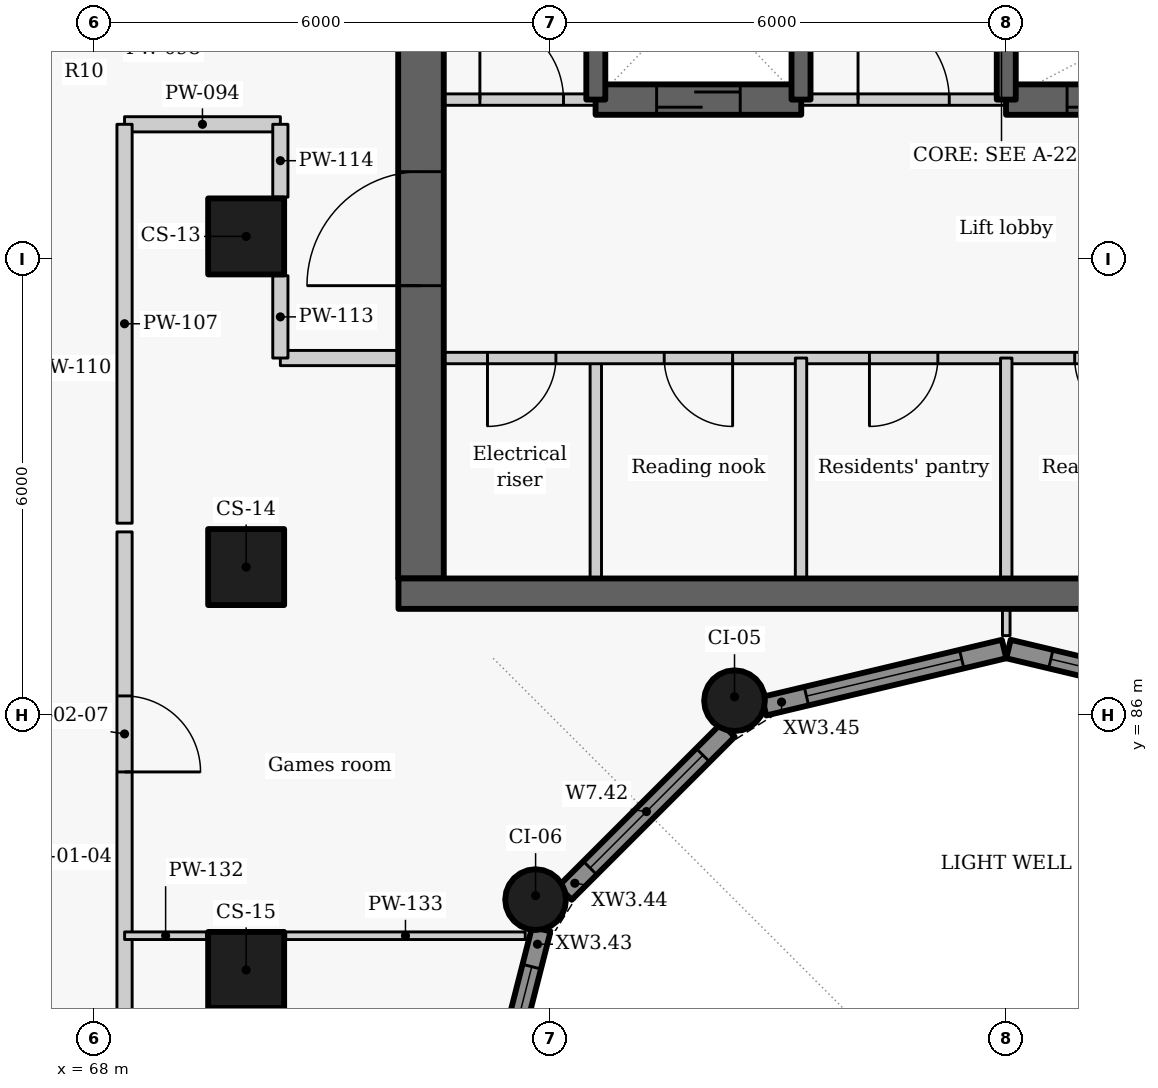
"""IFC4 building model, lengths in metres.
Left out: names, types, materials, properties, quantities, classifications, styles, units other than length and angle.
Written with IfcOpenShell. Run it as: python <this file> out.ifc"""

import sys

from ifc_helpers import new_model, si_unit, direction, frame, frame_2d, origin, origin_2d, place, context, subcontext, project, spatial, rectangle, circle, extrude, element, fill, save


model = new_model("IFC4")
c1 = context("Model", 3, precision=1e-05, world=origin(), true_north=direction((0.0, 1.0)))
c2 = subcontext(c1, "Body", "Model", "MODEL_VIEW")
j1 = project(units=[si_unit("LENGTHUNIT", "METRE"), si_unit("PLANEANGLEUNIT", "RADIAN")], contexts=[c1])
p1 = place(None, origin())
s1 = spatial("IfcSite", under=j1, at=p1, CompositionType="ELEMENT")
p2 = place(p1, origin())
s2 = spatial("IfcBuilding", under=s1, at=p2, CompositionType="ELEMENT")
p3 = place(p2, frame((0.0, 0.0, 160.2)))
s3 = spatial("IfcBuildingStorey", under=s2, at=p3, CompositionType="ELEMENT", Elevation=160.2)
for number, where, z_axis, x_axis in (
    (1, (70.0, 92.3, 0.0), (0.0, 0.0, 1.0), (0.0, -1.0, 0.0)),
    (2, (70.0, 87.95, 0.0), (0.0, 0.0, 1.0), (0.0, -1.0, 0.0)),
    (3, (70.0, 82.65, 0.0), (0.0, 0.0, 1.0), (0.0, -1.0, 0.0)),
):
    element("IfcColumn", number, at=place(p3, frame(where, z_axis=z_axis, x_axis=x_axis)), inside=s3, PredefinedType="COLUMN", context=c2, shape_type="SweptSolid", body=[
        extrude(rectangle(XDim=1.0, YDim=1.0, at=origin_2d()), origin(), (0.0, 0.0, 1.0), 3.3),
    ])
for number, where, z_axis, x_axis in (
    (4, (76.425, 86.192, 0.0), (0.0, 0.0, 1.0), (-0.866, -0.5, 0.0)),
    (5, (73.808, 83.575, 0.0), (0.0, 0.0, 1.0), (-0.5, -0.866, 0.0)),
):
    element("IfcColumn", number, at=place(p3, frame(where, z_axis=z_axis, x_axis=x_axis)), inside=s3, PredefinedType="COLUMN", context=c2, shape_type="SweptSolid", body=[
        extrude(circle(Radius=0.4, at=origin_2d()), origin(), (0.0, 0.0, 1.0), 3.3),
    ])
p4 = place(p3, frame((73.14, 80.27, 0.0), z_axis=(0.0, 0.0, 1.0), x_axis=(0.247055971283, 0.969001211069, 0.0)))
e6 = element("IfcWall", 6, at=p4, inside=s3, PredefinedType="SOLIDWALL", context=c2, shape_type="SweptSolid", body=[
    extrude(rectangle(XDim=3.01, YDim=0.25, at=frame_2d((1.505, 0.0))), origin(), (0.0, 0.0, 1.0), 2.425),
])
p5 = place(p4, frame((0.401, 0.0, 0.9)))
e7 = element("IfcOpeningElement", 7, at=p5, cuts=e6, PredefinedType="OPENING", context=c2, shape_type="SweptSolid", body=[
    extrude(rectangle(XDim=2.1, YDim=1.1, at=frame_2d((1.05, 0.55))), frame((0.0, 0.135, 0.0), z_axis=(0.0, -1.0, 0.0), x_axis=(1.0, 0.0, 0.0)), (0.0, 0.0, 1.0), 0.27),
])
p6 = place(p3, frame((74.194, 83.661, 0.0), z_axis=(0.0, 0.0, 1.0), x_axis=(0.707106781187, 0.707106781187, 0.0)))
e8 = element("IfcWall", 8, at=p6, inside=s3, PredefinedType="SOLIDWALL", context=c2, shape_type="SweptSolid", body=[
    extrude(rectangle(XDim=3.033, YDim=0.25, at=frame_2d((1.517, 0.0))), origin(), (0.0, 0.0, 1.0), 2.425),
])
p7 = place(p6, frame((0.467, 0.0, 0.9)))
e9 = element("IfcOpeningElement", 9, at=p7, cuts=e8, PredefinedType="OPENING", context=c2, shape_type="SweptSolid", body=[
    extrude(rectangle(XDim=2.1, YDim=1.1, at=frame_2d((1.05, 0.55))), frame((0.0, 0.135, 0.0), z_axis=(0.0, -1.0, 0.0), x_axis=(1.0, 0.0, 0.0)), (0.0, 0.0, 1.0), 0.27),
])
p8 = place(p3, frame((76.814, 86.119, 0.0), z_axis=(0.0, 0.0, 1.0), x_axis=(0.972773113459, 0.231759508395, 0.0)))
e10 = element("IfcWall", 10, at=p8, inside=s3, PredefinedType="SOLIDWALL", context=c2, shape_type="SweptSolid", body=[
    extrude(rectangle(XDim=3.246, YDim=0.25, at=frame_2d((1.623, 0.0))), origin(), (0.0, 0.0, 1.0), 2.425),
])
p9 = place(p8, frame((0.573, 0.0, 0.9)))
e11 = element("IfcOpeningElement", 11, at=p9, cuts=e10, PredefinedType="OPENING", context=c2, shape_type="SweptSolid", body=[
    extrude(rectangle(XDim=2.1, YDim=1.1, at=frame_2d((1.05, 0.55))), frame((0.0, 0.135, 0.0), z_axis=(0.0, -1.0, 0.0), x_axis=(1.0, 0.0, 0.0)), (0.0, 0.0, 1.0), 0.27),
])
p10 = place(p3, frame((80.029, 86.872, 0.0), z_axis=(0.0, 0.0, 1.0), x_axis=(0.972773113459, -0.231759508395, 0.0)))
e12 = element("IfcWall", 12, at=p10, inside=s3, PredefinedType="SOLIDWALL", context=c2, shape_type="SweptSolid", body=[
    extrude(rectangle(XDim=3.246, YDim=0.25, at=frame_2d((1.623, 0.0))), origin(), (0.0, 0.0, 1.0), 2.425),
])
p11 = place(p10, frame((0.573, 0.0, 0.9)))
e13 = element("IfcOpeningElement", 13, at=p11, cuts=e12, PredefinedType="OPENING", context=c2, shape_type="SweptSolid", body=[
    extrude(rectangle(XDim=2.1, YDim=1.1, at=frame_2d((1.05, 0.55))), frame((0.0, 0.135, 0.0), z_axis=(0.0, -1.0, 0.0), x_axis=(1.0, 0.0, 0.0)), (0.0, 0.0, 1.0), 0.27),
])
p12 = place(p3, frame((74.6, 87.8, 0.0), z_axis=(0.0, 0.0, 1.0), x_axis=(0.0, 1.0, 0.0)))
e14 = element("IfcWall", 14, at=p12, inside=s3, PredefinedType="PARTITIONING", context=c2, shape_type="SweptSolid", body=[
    extrude(rectangle(XDim=2.9, YDim=0.15, at=frame_2d((1.45, 0.0))), origin(), (0.0, 0.0, 1.0), 3.025),
])
p13 = place(p3, frame((85.4, 90.7, 0.0), z_axis=(0.0, 0.0, 1.0), x_axis=(-1.0, 0.0, 0.0)))
e15 = element("IfcWall", 15, at=p13, inside=s3, PredefinedType="PARTITIONING", context=c2, shape_type="SweptSolid", body=[
    extrude(rectangle(XDim=13.4, YDim=0.15, at=frame_2d((6.7, 0.0))), origin(), (0.0, 0.0, 1.0), 3.025),
])
p14 = place(p13, frame((11.325, 0.0, 0.0)))
e16 = element("IfcOpeningElement", 16, at=p14, cuts=e15, PredefinedType="OPENING", context=c2, shape_type="SweptSolid", body=[
    extrude(rectangle(XDim=0.9, YDim=2.1, at=frame_2d((0.45, 1.05))), frame((0.0, 0.085, 0.0), z_axis=(0.0, -1.0, 0.0), x_axis=(1.0, 0.0, 0.0)), (0.0, 0.0, 1.0), 0.17),
])
p15 = place(p13, frame((9.0, 0.0, 0.0)))
e17 = element("IfcOpeningElement", 17, at=p15, cuts=e15, PredefinedType="OPENING", context=c2, shape_type="SweptSolid", body=[
    extrude(rectangle(XDim=0.9, YDim=2.1, at=frame_2d((0.45, 1.05))), frame((0.0, 0.085, 0.0), z_axis=(0.0, -1.0, 0.0), x_axis=(1.0, 0.0, 0.0)), (0.0, 0.0, 1.0), 0.17),
])
p16 = place(p13, frame((6.3, 0.0, 0.0)))
e18 = element("IfcOpeningElement", 18, at=p16, cuts=e15, PredefinedType="OPENING", context=c2, shape_type="SweptSolid", body=[
    extrude(rectangle(XDim=0.9, YDim=2.1, at=frame_2d((0.45, 1.05))), frame((0.0, 0.085, 0.0), z_axis=(0.0, -1.0, 0.0), x_axis=(1.0, 0.0, 0.0)), (0.0, 0.0, 1.0), 0.17),
])
p17 = place(p13, frame((3.6, 0.0, 0.0)))
e19 = element("IfcOpeningElement", 19, at=p17, cuts=e15, PredefinedType="OPENING", context=c2, shape_type="SweptSolid", body=[
    extrude(rectangle(XDim=0.9, YDim=2.1, at=frame_2d((0.45, 1.05))), frame((0.0, 0.085, 0.0), z_axis=(0.0, -1.0, 0.0), x_axis=(1.0, 0.0, 0.0)), (0.0, 0.0, 1.0), 0.17),
])
p18 = place(p13, frame((0.9, 0.0, 0.0)))
e20 = element("IfcOpeningElement", 20, at=p18, cuts=e15, PredefinedType="OPENING", context=c2, shape_type="SweptSolid", body=[
    extrude(rectangle(XDim=0.9, YDim=2.1, at=frame_2d((0.45, 1.05))), frame((0.0, 0.085, 0.0), z_axis=(0.0, -1.0, 0.0), x_axis=(1.0, 0.0, 0.0)), (0.0, 0.0, 1.0), 0.17),
])
p19 = place(p3, frame((72.3, 87.8, -0.275), z_axis=(0.0, 0.0, 1.0), x_axis=(0.0, 1.0, 0.0)))
e21 = element("IfcWall", 21, at=p19, inside=s3, PredefinedType="SHEAR", context=c2, shape_type="SweptSolid", body=[
    extrude(rectangle(XDim=9.1, YDim=0.6, at=frame_2d((4.55, 0.0))), origin(), (0.0, 0.0, 1.0), 3.3),
])
p20 = place(p19, frame((3.852, 0.0, 0.275)))
e22 = element("IfcOpeningElement", 22, at=p20, cuts=e21, PredefinedType="OPENING", context=c2, shape_type="SweptSolid", body=[
    extrude(rectangle(XDim=1.5, YDim=2.1, at=frame_2d((0.75, 1.05))), frame((0.0, 0.31, 0.0), z_axis=(0.0, -1.0, 0.0), x_axis=(1.0, 0.0, 0.0)), (0.0, 0.0, 1.0), 0.62),
])
for number, where, z_axis, x_axis in (
    (23, (77.3, 87.8, 0.0), (0.0, 0.0, 1.0), (0.0, 1.0, 0.0)),
    (24, (80.0, 87.8, 0.0), (0.0, 0.0, 1.0), (0.0, 1.0, 0.0)),
):
    element("IfcWall", number, at=place(p3, frame(where, z_axis=z_axis, x_axis=x_axis)), inside=s3, PredefinedType="PARTITIONING", context=c2, shape_type="SweptSolid", body=[
        extrude(rectangle(XDim=2.9, YDim=0.15, at=frame_2d((1.45, 0.0))), origin(), (0.0, 0.0, 1.0), 3.025),
    ])
p21 = place(p3, frame((72.0, 94.1, 0.0), z_axis=(0.0, 0.0, 1.0), x_axis=(1.0, 0.0, 0.0)))
e25 = element("IfcWall", 25, at=p21, inside=s3, PredefinedType="PARTITIONING", context=c2, shape_type="SweptSolid", body=[
    extrude(rectangle(XDim=2.603, YDim=0.15, at=frame_2d((1.302, 0.0))), origin(), (0.0, 0.0, 1.0), 3.025),
])
p22 = place(p21, frame((1.075, 0.0, 0.0)))
e26 = element("IfcOpeningElement", 26, at=p22, cuts=e25, PredefinedType="OPENING", context=c2, shape_type="SweptSolid", body=[
    extrude(rectangle(XDim=1.1, YDim=2.1, at=frame_2d((0.55, 1.05))), frame((0.0, 0.085, 0.0), z_axis=(0.0, -1.0, 0.0), x_axis=(1.0, 0.0, 0.0)), (0.0, 0.0, 1.0), 0.17),
])
p23 = place(p3, frame((77.297, 94.1, 0.0), z_axis=(0.0, 0.0, 1.0), x_axis=(1.0, 0.0, 0.0)))
e27 = element("IfcWall", 27, at=p23, inside=s3, PredefinedType="PARTITIONING", context=c2, shape_type="SweptSolid", body=[
    extrude(rectangle(XDim=2.706, YDim=0.15, at=frame_2d((1.353, 0.0))), origin(), (0.0, 0.0, 1.0), 3.025),
])
p24 = place(p23, frame((0.753, 0.0, 0.0)))
e28 = element("IfcOpeningElement", 28, at=p24, cuts=e27, PredefinedType="OPENING", context=c2, shape_type="SweptSolid", body=[
    extrude(rectangle(XDim=1.2, YDim=2.1, at=frame_2d((0.6, 1.05))), frame((0.0, 0.085, 0.0), z_axis=(0.0, -1.0, 0.0), x_axis=(1.0, 0.0, 0.0)), (0.0, 0.0, 1.0), 0.17),
])
p25 = place(p3, frame((74.597, 94.1, -0.275), z_axis=(0.0, 0.0, 1.0), x_axis=(1.0, 0.0, 0.0)))
e29 = element("IfcWall", 29, at=p25, inside=s3, PredefinedType="SHEAR", context=c2, shape_type="SweptSolid", body=[
    extrude(rectangle(XDim=2.706, YDim=0.4, at=frame_2d((1.353, 0.0))), origin(), (0.0, 0.0, 1.0), 3.3),
])
p26 = place(p25, frame((0.803, 0.0, 0.275)))
e30 = element("IfcOpeningElement", 30, at=p26, cuts=e29, PredefinedType="OPENING", context=c2, shape_type="SweptSolid", body=[
    extrude(rectangle(XDim=1.1, YDim=2.1, at=frame_2d((0.55, 1.05))), frame((0.0, 0.21, 0.0), z_axis=(0.0, -1.0, 0.0), x_axis=(1.0, 0.0, 0.0)), (0.0, 0.0, 1.0), 0.42),
])
p27 = place(p3, frame((79.997, 94.1, -0.275), z_axis=(0.0, 0.0, 1.0), x_axis=(1.0, 0.0, 0.0)))
e31 = element("IfcWall", 31, at=p27, inside=s3, PredefinedType="SHEAR", context=c2, shape_type="SweptSolid", body=[
    extrude(rectangle(XDim=5.406, YDim=0.4, at=frame_2d((2.703, 0.0))), origin(), (0.0, 0.0, 1.0), 3.3),
])
p28 = place(p27, frame((0.803, 0.0, 0.275)))
e32 = element("IfcOpeningElement", 32, at=p28, cuts=e31, PredefinedType="OPENING", context=c2, shape_type="SweptSolid", body=[
    extrude(rectangle(XDim=1.1, YDim=2.1, at=frame_2d((0.55, 1.05))), frame((0.0, 0.21, 0.0), z_axis=(0.0, -1.0, 0.0), x_axis=(1.0, 0.0, 0.0)), (0.0, 0.0, 1.0), 0.42),
])
for number, where, z_axis, x_axis in (
    (33, (74.6, 94.1, -0.275), (0.0, 0.0, 1.0), (0.0, 1.0, 0.0)),
    (34, (77.3, 94.1, -0.275), (0.0, 0.0, 1.0), (0.0, 1.0, 0.0)),
    (35, (80.0, 94.1, -0.275), (0.0, 0.0, 1.0), (0.0, 1.0, 0.0)),
):
    element("IfcWall", number, at=place(p3, frame(where, z_axis=z_axis, x_axis=x_axis)), inside=s3, PredefinedType="SHEAR", context=c2, shape_type="SweptSolid", body=[
        extrude(rectangle(XDim=2.8, YDim=0.25, at=frame_2d((1.4, 0.0))), origin(), (0.0, 0.0, 1.0), 3.3),
    ])
p29 = place(p3, frame((68.4, 93.775, 0.0), z_axis=(0.0, 0.0, 1.0), x_axis=(1.0, 0.0, 0.0)))
e36 = element("IfcWall", 36, at=p29, inside=s3, PredefinedType="PARTITIONING", context=c2, shape_type="SweptSolid", body=[
    extrude(rectangle(XDim=2.05, YDim=0.2, at=frame_2d((1.025, 0.0))), origin(), (0.0, 0.0, 1.0), 2.505),
])
p30 = place(p3, frame((70.45, 90.7, 0.0), z_axis=(0.0, 0.0, 1.0), x_axis=(1.0, 0.0, 0.0)))
e37 = element("IfcWall", 37, at=p30, inside=s3, PredefinedType="PARTITIONING", context=c2, shape_type="SweptSolid", body=[
    extrude(rectangle(XDim=1.55, YDim=0.2, at=frame_2d((0.775, 0.0))), origin(), (0.0, 0.0, 1.0), 3.025),
])
p31 = place(p3, frame((68.4, 88.413, 0.0), z_axis=(0.0, 0.0, 1.0), x_axis=(0.0, -1.0, 0.0)))
e38 = element("IfcWall", 38, at=p31, inside=s3, PredefinedType="PARTITIONING", context=c2, shape_type="SweptSolid", body=[
    extrude(rectangle(XDim=10.486, YDim=0.2, at=frame_2d((5.243, 0.0))), origin(), (0.0, 0.0, 1.0), 3.025),
])
p32 = place(p31, frame((2.158, 0.0, 0.0)))
e39 = element("IfcOpeningElement", 39, at=p32, cuts=e38, PredefinedType="OPENING", context=c2, shape_type="SweptSolid", body=[
    extrude(rectangle(XDim=1.0, YDim=2.1, at=frame_2d((0.5, 1.05))), frame((0.0, 0.11, 0.0), z_axis=(0.0, -1.0, 0.0), x_axis=(1.0, 0.0, 0.0)), (0.0, 0.0, 1.0), 0.22),
])
p33 = place(p3, frame((68.4, 88.527, 0.0), z_axis=(0.0, 0.0, 1.0), x_axis=(0.0, 1.0, 0.0)))
e40 = element("IfcWall", 40, at=p33, inside=s3, PredefinedType="PARTITIONING", context=c2, shape_type="SweptSolid", body=[
    extrude(rectangle(XDim=5.248, YDim=0.2, at=frame_2d((2.624, 0.0))), origin(), (0.0, 0.0, 1.0), 3.025),
])
p34 = place(p3, frame((70.45, 90.7, 0.0), z_axis=(0.0, 0.0, 1.0), x_axis=(0.0, 1.0, 0.0)))
e41 = element("IfcWall", 41, at=p34, inside=s3, PredefinedType="PARTITIONING", context=c2, shape_type="SweptSolid", body=[
    extrude(rectangle(XDim=1.083, YDim=0.2, at=frame_2d((0.542, 0.0))), origin(), (0.0, 0.0, 1.0), 3.025),
])
p35 = place(p3, frame((70.45, 92.817, 0.0), z_axis=(0.0, 0.0, 1.0), x_axis=(0.0, 1.0, 0.0)))
e42 = element("IfcWall", 42, at=p35, inside=s3, PredefinedType="PARTITIONING", context=c2, shape_type="SweptSolid", body=[
    extrude(rectangle(XDim=0.958, YDim=0.2, at=frame_2d((0.479, 0.0))), origin(), (0.0, 0.0, 1.0), 3.025),
])
p36 = place(p3, frame((80.0, 87.048, 0.0), z_axis=(0.0, 0.0, 1.0), x_axis=(0.0, 1.0, 0.0)))
e43 = element("IfcWall", 43, at=p36, inside=s3, PredefinedType="PARTITIONING", context=c2, shape_type="SweptSolid", body=[
    extrude(rectangle(XDim=0.352, YDim=0.1, at=frame_2d((0.176, 0.0))), origin(), (0.0, 0.0, 1.0), 3.025),
])
p37 = place(p3, frame((68.401, 83.1, 0.0), z_axis=(0.0, 0.0, 1.0), x_axis=(1.0, 0.0, 0.0)))
e44 = element("IfcWall", 44, at=p37, inside=s3, PredefinedType="PARTITIONING", context=c2, shape_type="SweptSolid", body=[
    extrude(rectangle(XDim=1.079, YDim=0.1, at=frame_2d((0.54, 0.0))), origin(), (0.0, 0.0, 1.0), 3.025),
])
p38 = place(p3, frame((70.52, 83.1, 0.0), z_axis=(0.0, 0.0, 1.0), x_axis=(1.0, 0.0, 0.0)))
e45 = element("IfcWall", 45, at=p38, inside=s3, PredefinedType="PARTITIONING", context=c2, shape_type="SweptSolid", body=[
    extrude(rectangle(XDim=3.152, YDim=0.1, at=frame_2d((1.576, 0.0))), origin(), (0.0, 0.0, 1.0), 3.025),
])
p39 = place(p3, frame((72.004, 87.6, -0.275), z_axis=(0.0, 0.0, 1.0), x_axis=(1.0, 0.0, 0.0)))
e46 = element("IfcWall", 46, at=p39, inside=s3, PredefinedType="SHEAR", context=c2, shape_type="SweptSolid", body=[
    extrude(rectangle(XDim=15.992, YDim=0.4, at=frame_2d((7.996, 0.0))), origin(), (0.0, 0.0, 1.0), 3.3),
])
p40 = place(p5, origin())
e47 = element("IfcWindow", 47, at=p40, inside=s3, PartitioningType="SINGLE_PANEL", PredefinedType="WINDOW", context=c2, shape_type="SweptSolid", body=[
    extrude(rectangle(XDim=2.1, YDim=1.1, at=frame_2d((1.05, 0.55))), frame((0.0, 0.03, 0.0), z_axis=(0.0, -1.0, 0.0), x_axis=(1.0, 0.0, 0.0)), (0.0, 0.0, 1.0), 0.06),
])
fill(e7, e47)
p41 = place(p7, origin())
e48 = element("IfcWindow", 48, at=p41, inside=s3, PartitioningType="SINGLE_PANEL", PredefinedType="WINDOW", context=c2, shape_type="SweptSolid", body=[
    extrude(rectangle(XDim=2.1, YDim=1.1, at=frame_2d((1.05, 0.55))), frame((0.0, 0.03, 0.0), z_axis=(0.0, -1.0, 0.0), x_axis=(1.0, 0.0, 0.0)), (0.0, 0.0, 1.0), 0.06),
])
fill(e9, e48)
p42 = place(p9, origin())
e49 = element("IfcWindow", 49, at=p42, inside=s3, PartitioningType="SINGLE_PANEL", PredefinedType="WINDOW", context=c2, shape_type="SweptSolid", body=[
    extrude(rectangle(XDim=2.1, YDim=1.1, at=frame_2d((1.05, 0.55))), frame((0.0, 0.03, 0.0), z_axis=(0.0, -1.0, 0.0), x_axis=(1.0, 0.0, 0.0)), (0.0, 0.0, 1.0), 0.06),
])
fill(e11, e49)
p43 = place(p11, origin())
e50 = element("IfcWindow", 50, at=p43, inside=s3, PartitioningType="SINGLE_PANEL", PredefinedType="WINDOW", context=c2, shape_type="SweptSolid", body=[
    extrude(rectangle(XDim=2.1, YDim=1.1, at=frame_2d((1.05, 0.55))), frame((0.0, 0.03, 0.0), z_axis=(0.0, -1.0, 0.0), x_axis=(1.0, 0.0, 0.0)), (0.0, 0.0, 1.0), 0.06),
])
fill(e13, e50)
p44 = place(p14, origin())
e51 = element("IfcDoor", 51, at=p44, inside=s3, OperationType="SINGLE_SWING_RIGHT", PredefinedType="DOOR", context=c2, shape_type="SweptSolid", body=[
    extrude(rectangle(XDim=0.9, YDim=2.1, at=frame_2d((0.45, 1.05))), frame((0.0, 0.025, 0.0), z_axis=(0.0, -1.0, 0.0), x_axis=(1.0, 0.0, 0.0)), (0.0, 0.0, 1.0), 0.05),
])
fill(e16, e51)
p45 = place(p15, origin())
e52 = element("IfcDoor", 52, at=p45, inside=s3, OperationType="SINGLE_SWING_LEFT", PredefinedType="DOOR", context=c2, shape_type="SweptSolid", body=[
    extrude(rectangle(XDim=0.9, YDim=2.1, at=frame_2d((0.45, 1.05))), frame((0.0, 0.025, 0.0), z_axis=(0.0, -1.0, 0.0), x_axis=(1.0, 0.0, 0.0)), (0.0, 0.0, 1.0), 0.05),
])
fill(e17, e52)
p46 = place(p16, origin())
e53 = element("IfcDoor", 53, at=p46, inside=s3, OperationType="SINGLE_SWING_RIGHT", PredefinedType="DOOR", context=c2, shape_type="SweptSolid", body=[
    extrude(rectangle(XDim=0.9, YDim=2.1, at=frame_2d((0.45, 1.05))), frame((0.0, 0.025, 0.0), z_axis=(0.0, -1.0, 0.0), x_axis=(1.0, 0.0, 0.0)), (0.0, 0.0, 1.0), 0.05),
])
fill(e18, e53)
p47 = place(p17, origin())
e54 = element("IfcDoor", 54, at=p47, inside=s3, OperationType="SINGLE_SWING_LEFT", PredefinedType="DOOR", context=c2, shape_type="SweptSolid", body=[
    extrude(rectangle(XDim=0.9, YDim=2.1, at=frame_2d((0.45, 1.05))), frame((0.0, 0.025, 0.0), z_axis=(0.0, -1.0, 0.0), x_axis=(1.0, 0.0, 0.0)), (0.0, 0.0, 1.0), 0.05),
])
fill(e19, e54)
p48 = place(p22, origin())
e55 = element("IfcDoor", 55, at=p48, inside=s3, OperationType="SINGLE_SWING_LEFT", PredefinedType="DOOR", context=c2, shape_type="SweptSolid", body=[
    extrude(rectangle(XDim=1.1, YDim=2.1, at=frame_2d((0.55, 1.05))), frame((0.0, 0.025, 0.0), z_axis=(0.0, -1.0, 0.0), x_axis=(1.0, 0.0, 0.0)), (0.0, 0.0, 1.0), 0.05),
])
fill(e26, e55)
p49 = place(p26, origin())
e56 = element("IfcDoor", 56, at=p49, inside=s3, OperationType="SLIDING_TO_LEFT", PredefinedType="DOOR", context=c2, shape_type="SweptSolid", body=[
    extrude(rectangle(XDim=1.1, YDim=2.1, at=frame_2d((0.55, 1.05))), frame((0.0, 0.025, 0.0), z_axis=(0.0, -1.0, 0.0), x_axis=(1.0, 0.0, 0.0)), (0.0, 0.0, 1.0), 0.05),
])
fill(e30, e56)
p50 = place(p24, origin())
e57 = element("IfcDoor", 57, at=p50, inside=s3, OperationType="DOUBLE_DOOR_SINGLE_SWING", PredefinedType="DOOR", context=c2, shape_type="SweptSolid", body=[
    extrude(rectangle(XDim=1.2, YDim=2.1, at=frame_2d((0.6, 1.05))), frame((0.0, 0.025, 0.0), z_axis=(0.0, -1.0, 0.0), x_axis=(1.0, 0.0, 0.0)), (0.0, 0.0, 1.0), 0.05),
])
fill(e28, e57)
p51 = place(p28, origin())
e58 = element("IfcDoor", 58, at=p51, inside=s3, OperationType="SLIDING_TO_LEFT", PredefinedType="DOOR", context=c2, shape_type="SweptSolid", body=[
    extrude(rectangle(XDim=1.1, YDim=2.1, at=frame_2d((0.55, 1.05))), frame((0.0, 0.025, 0.0), z_axis=(0.0, -1.0, 0.0), x_axis=(1.0, 0.0, 0.0)), (0.0, 0.0, 1.0), 0.05),
])
fill(e32, e58)
p52 = place(p32, origin())
e59 = element("IfcDoor", 59, at=p52, inside=s3, OperationType="SINGLE_SWING_RIGHT", PredefinedType="DOOR", context=c2, shape_type="SweptSolid", body=[
    extrude(rectangle(XDim=1.0, YDim=2.1, at=frame_2d((0.5, 1.05))), frame((0.0, 0.025, 0.0), z_axis=(0.0, -1.0, 0.0), x_axis=(1.0, 0.0, 0.0)), (0.0, 0.0, 1.0), 0.05),
])
fill(e39, e59)
p53 = place(p20, origin())
e60 = element("IfcDoor", 60, at=p53, inside=s3, OperationType="DOUBLE_DOOR_SINGLE_SWING", PredefinedType="DOOR", context=c2, shape_type="SweptSolid", body=[
    extrude(rectangle(XDim=1.5, YDim=2.1, at=frame_2d((0.75, 1.05))), frame((0.0, 0.025, 0.0), z_axis=(0.0, -1.0, 0.0), x_axis=(1.0, 0.0, 0.0)), (0.0, 0.0, 1.0), 0.05),
])
fill(e22, e60)
save(model, sys.argv[1])
